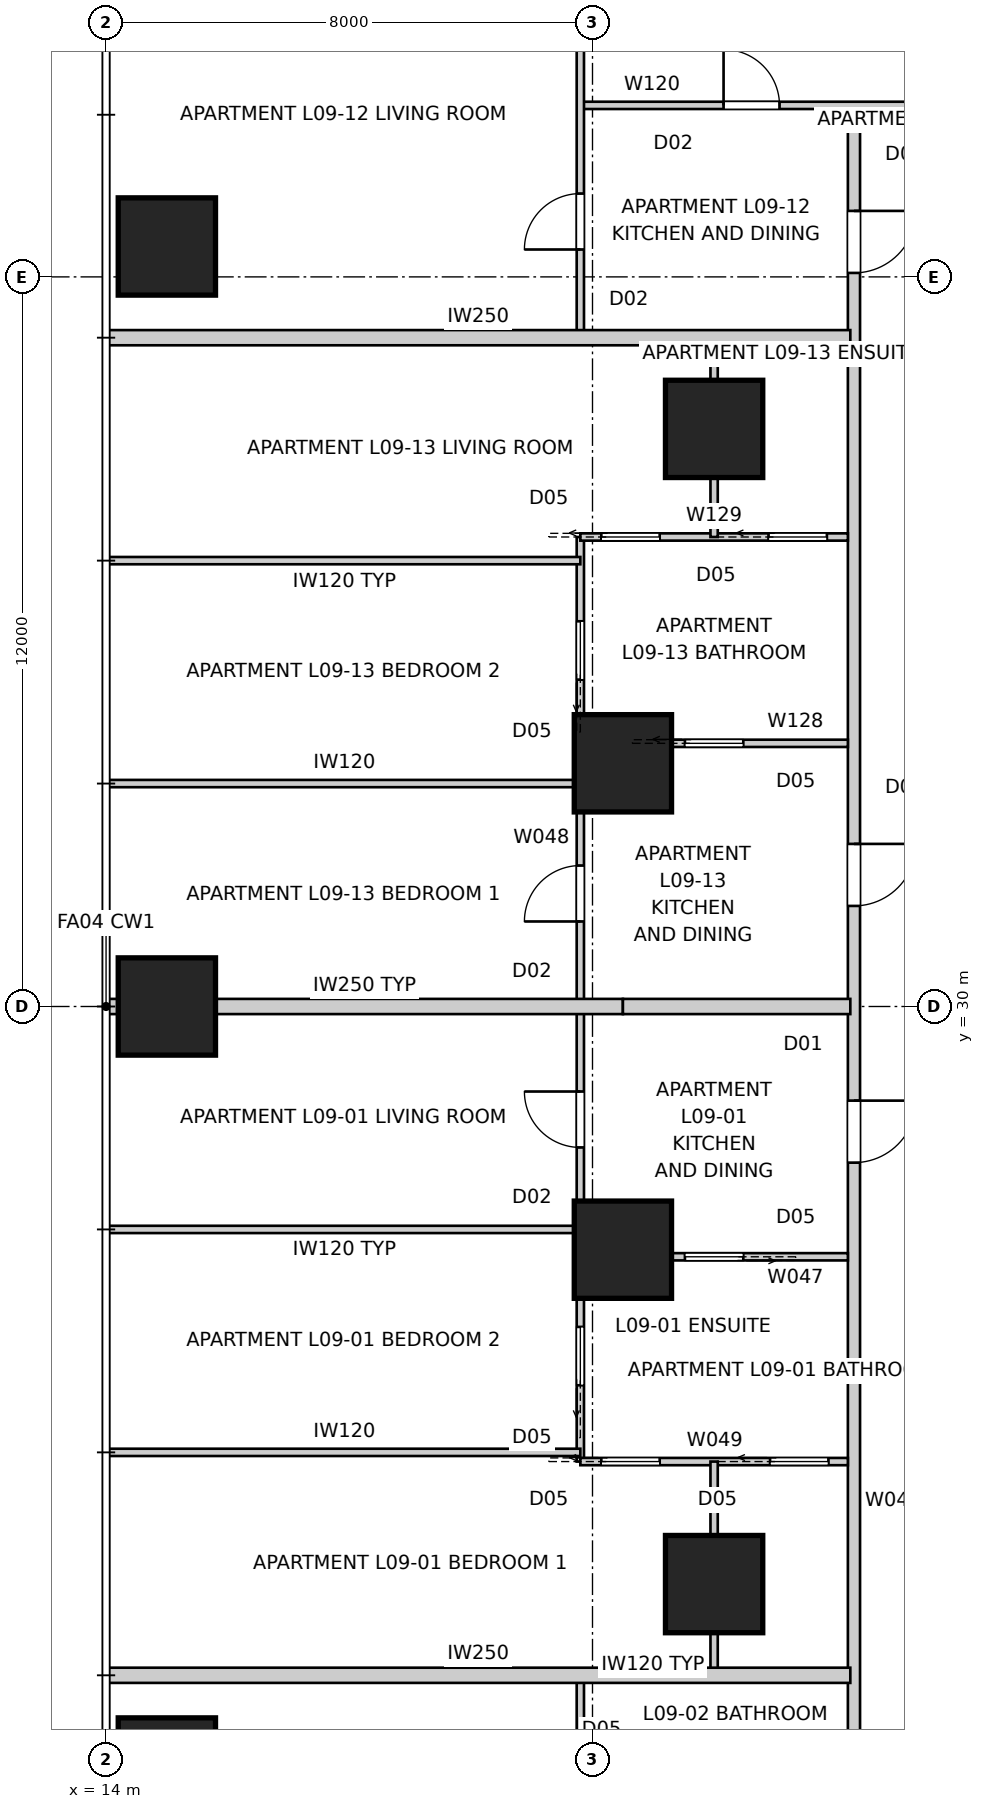
"""IFC4 building model, lengths in metres.
Left out: names, types, materials, properties, quantities, classifications, styles, units other than length and angle.
Written with IfcOpenShell. Run it as: python <this file> out.ifc"""

import sys

from ifc_helpers import new_model, si_unit, direction, frame, frame_2d, origin, origin_2d, place, context, subcontext, project, spatial, rectangle, extrude, element, fill, save


model = new_model("IFC4")
c1 = context("Model", 3, precision=1e-05, world=origin(), true_north=direction((0.0, 1.0)))
c2 = subcontext(c1, "Body", "Model", "MODEL_VIEW")
j1 = project(units=[si_unit("LENGTHUNIT", "METRE"), si_unit("PLANEANGLEUNIT", "RADIAN")], contexts=[c1])
p1 = place(None, origin())
s1 = spatial("IfcSite", under=j1, at=p1, CompositionType="ELEMENT")
p2 = place(p1, origin())
s2 = spatial("IfcBuilding", under=s1, at=p2, CompositionType="ELEMENT")
p3 = place(p2, frame((0.0, 0.0, 35.4)))
s3 = spatial("IfcBuildingStorey", under=s2, at=p3, CompositionType="ELEMENT", Elevation=35.4)
for number, where, z_axis, x_axis in (
    (1, (15.0, 42.5, 0.0), (0.0, 0.0, 1.0), (1.0, 0.0, 0.0)),
    (2, (15.0, 30.0, 0.0), (0.0, 0.0, 1.0), (1.0, 0.0, 0.0)),
    (3, (15.0, 17.5, 0.0), (0.0, 0.0, 1.0), (1.0, 0.0, 0.0)),
    (4, (24.0, 39.5, 0.0), (0.0, 0.0, 1.0), (1.0, 0.0, 0.0)),
    (5, (22.5, 34.0, 0.0), (0.0, 0.0, 1.0), (1.0, 0.0, 0.0)),
    (6, (22.5, 26.0, 0.0), (0.0, 0.0, 1.0), (1.0, 0.0, 0.0)),
    (7, (24.0, 20.5, 0.0), (0.0, 0.0, 1.0), (1.0, 0.0, 0.0)),
):
    element("IfcColumn", number, at=place(p3, frame(where, z_axis=z_axis, x_axis=x_axis)), inside=s3, PredefinedType="COLUMN", context=c2, shape_type="SweptSolid", body=[
        extrude(rectangle(XDim=1.6, YDim=1.6, at=origin_2d()), origin(), (0.0, 0.0, 1.0), 3.4),
    ])
p4 = place(p3, frame((54.5, 44.5, 0.0), z_axis=(0.0, 0.0, 1.0), x_axis=(-1.0, 0.0, 0.0)))
e8 = element("IfcWall", 8, at=p4, inside=s3, PredefinedType="PARTITIONING", context=c2, shape_type="SweptSolid", body=[
    extrude(rectangle(XDim=28.2, YDim=0.2, at=frame_2d((14.1, 0.0))), origin(), (0.0, 0.0, 1.0), 3.25),
])
p5 = place(p4, frame((5.854, 0.0, 0.0)))
e9 = element("IfcOpeningElement", 9, at=p5, cuts=e8, PredefinedType="OPENING", context=c2, shape_type="SweptSolid", body=[
    extrude(rectangle(XDim=1.02, YDim=2.34, at=frame_2d((0.51, 1.17))), frame((0.0, 0.11, 0.0), z_axis=(0.0, -1.0, 0.0), x_axis=(1.0, 0.0, 0.0)), (0.0, 0.0, 1.0), 0.22),
])
p6 = place(p4, frame((18.518, 0.0, 0.0)))
e10 = element("IfcOpeningElement", 10, at=p6, cuts=e8, PredefinedType="OPENING", context=c2, shape_type="SweptSolid", body=[
    extrude(rectangle(XDim=1.02, YDim=2.34, at=frame_2d((0.51, 1.17))), frame((0.0, 0.11, 0.0), z_axis=(0.0, -1.0, 0.0), x_axis=(1.0, 0.0, 0.0)), (0.0, 0.0, 1.0), 0.22),
])
p7 = place(p4, frame((1.415, 0.0, 0.0)))
e11 = element("IfcOpeningElement", 11, at=p7, cuts=e8, PredefinedType="OPENING", context=c2, shape_type="SweptSolid", body=[
    extrude(rectangle(XDim=1.02, YDim=2.34, at=frame_2d((0.51, 1.17))), frame((0.0, 0.11, 0.0), z_axis=(0.0, -1.0, 0.0), x_axis=(1.0, 0.0, 0.0)), (0.0, 0.0, 1.0), 0.22),
])
p8 = place(p3, frame((26.3, 44.5, 0.0), z_axis=(0.0, 0.0, 1.0), x_axis=(0.0, -1.0, 0.0)))
e12 = element("IfcWall", 12, at=p8, inside=s3, PredefinedType="PARTITIONING", context=c2, shape_type="SweptSolid", body=[
    extrude(rectangle(XDim=28.2, YDim=0.2, at=frame_2d((14.1, 0.0))), origin(), (0.0, 0.0, 1.0), 3.25),
])
p9 = place(p8, frame((11.826, 0.0, 0.0)))
e13 = element("IfcOpeningElement", 13, at=p9, cuts=e12, PredefinedType="OPENING", context=c2, shape_type="SweptSolid", body=[
    extrude(rectangle(XDim=1.02, YDim=2.34, at=frame_2d((0.51, 1.17))), frame((0.0, 0.11, 0.0), z_axis=(0.0, -1.0, 0.0), x_axis=(1.0, 0.0, 0.0)), (0.0, 0.0, 1.0), 0.22),
])
p10 = place(p8, frame((16.048, 0.0, 0.0)))
e14 = element("IfcOpeningElement", 14, at=p10, cuts=e12, PredefinedType="OPENING", context=c2, shape_type="SweptSolid", body=[
    extrude(rectangle(XDim=1.02, YDim=2.34, at=frame_2d((0.51, 1.17))), frame((0.0, 0.11, 0.0), z_axis=(0.0, -1.0, 0.0), x_axis=(1.0, 0.0, 0.0)), (0.0, 0.0, 1.0), 0.22),
])
p11 = place(p8, frame((1.415, 0.0, 0.0)))
e15 = element("IfcOpeningElement", 15, at=p11, cuts=e12, PredefinedType="OPENING", context=c2, shape_type="SweptSolid", body=[
    extrude(rectangle(XDim=1.02, YDim=2.1, at=frame_2d((0.51, 1.05))), frame((0.0, 0.11, 0.0), z_axis=(0.0, -1.0, 0.0), x_axis=(1.0, 0.0, 0.0)), (0.0, 0.0, 1.0), 0.22),
])
for number, where, z_axis, x_axis in (
    (16, (14.0, 41.0, 0.0), (0.0, 0.0, 1.0), (1.0, 0.0, 0.0)),
    (17, (14.0, 19.0, 0.0), (0.0, 0.0, 1.0), (1.0, 0.0, 0.0)),
):
    element("IfcWall", number, at=place(p3, frame(where, z_axis=z_axis, x_axis=x_axis)), inside=s3, PredefinedType="PARTITIONING", context=c2, shape_type="SweptSolid", body=[
        extrude(rectangle(XDim=12.24, YDim=0.25, at=frame_2d((6.12, 0.0))), origin(), (0.0, 0.0, 1.0), 3.25),
    ])
p12 = place(p3, frame((14.0, 30.0, 0.0), z_axis=(0.0, 0.0, 1.0), x_axis=(1.0, 0.0, 0.0)))
e18 = element("IfcWall", 18, at=p12, inside=s3, PredefinedType="PARTITIONING", context=c2, shape_type="SweptSolid", body=[
    extrude(rectangle(XDim=8.5, YDim=0.25, at=frame_2d((4.25, 0.0))), origin(), (0.0, 0.0, 1.0), 3.25),
])
p13 = place(p3, frame((22.5, 30.0, 0.0), z_axis=(0.0, 0.0, 1.0), x_axis=(1.0, 0.0, 0.0)))
e19 = element("IfcWall", 19, at=p13, inside=s3, PredefinedType="PARTITIONING", context=c2, shape_type="SweptSolid", body=[
    extrude(rectangle(XDim=3.74, YDim=0.25, at=frame_2d((1.87, 0.0))), origin(), (0.0, 0.0, 1.0), 2.796),
])
p14 = place(p3, frame((26.2, 25.884, 0.0), z_axis=(0.0, 0.0, 1.0), x_axis=(-1.0, 0.0, 0.0)))
e20 = element("IfcWall", 20, at=p14, inside=s3, PredefinedType="PARTITIONING", context=c2, shape_type="SweptSolid", body=[
    extrude(rectangle(XDim=4.4, YDim=0.12, at=frame_2d((2.2, 0.0))), origin(), (0.0, 0.0, 1.0), 3.25),
])
p15 = place(p14, frame((1.72, 0.0, 0.0)))
e21 = element("IfcOpeningElement", 21, at=p15, cuts=e20, PredefinedType="OPENING", context=c2, shape_type="SweptSolid", body=[
    extrude(rectangle(XDim=0.96, YDim=2.1, at=frame_2d((0.48, 1.05))), frame((0.0, 0.07, 0.0), z_axis=(0.0, -1.0, 0.0), x_axis=(1.0, 0.0, 0.0)), (0.0, 0.0, 1.0), 0.14),
])
p16 = place(p3, frame((21.8, 22.515, 0.0), z_axis=(0.0, 0.0, 1.0), x_axis=(0.0, 1.0, 0.0)))
e22 = element("IfcWall", 22, at=p16, inside=s3, PredefinedType="PARTITIONING", context=c2, shape_type="SweptSolid", body=[
    extrude(rectangle(XDim=15.207, YDim=0.12, at=frame_2d((7.603, 0.0))), origin(), (0.0, 0.0, 1.0), 3.25),
])
p17 = place(p16, frame((8.883, 0.0, 0.0)))
e23 = element("IfcOpeningElement", 23, at=p17, cuts=e22, PredefinedType="OPENING", context=c2, shape_type="SweptSolid", body=[
    extrude(rectangle(XDim=0.92, YDim=2.34, at=frame_2d((0.46, 1.17))), frame((0.0, 0.07, 0.0), z_axis=(0.0, -1.0, 0.0), x_axis=(1.0, 0.0, 0.0)), (0.0, 0.0, 1.0), 0.14),
])
p18 = place(p16, frame((5.166, 0.0, 0.0)))
e24 = element("IfcOpeningElement", 24, at=p18, cuts=e22, PredefinedType="OPENING", context=c2, shape_type="SweptSolid", body=[
    extrude(rectangle(XDim=0.92, YDim=2.34, at=frame_2d((0.46, 1.17))), frame((0.0, 0.07, 0.0), z_axis=(0.0, -1.0, 0.0), x_axis=(1.0, 0.0, 0.0)), (0.0, 0.0, 1.0), 0.14),
])
p19 = place(p16, frame((12.86, 0.0, 0.0)))
e25 = element("IfcOpeningElement", 25, at=p19, cuts=e22, PredefinedType="OPENING", context=c2, shape_type="SweptSolid", body=[
    extrude(rectangle(XDim=0.96, YDim=2.1, at=frame_2d((0.48, 1.05))), frame((0.0, 0.07, 0.0), z_axis=(0.0, -1.0, 0.0), x_axis=(1.0, 0.0, 0.0)), (0.0, 0.0, 1.0), 0.14),
])
p20 = place(p16, frame((1.255, 0.0, 0.0)))
e26 = element("IfcOpeningElement", 26, at=p20, cuts=e22, PredefinedType="OPENING", context=c2, shape_type="SweptSolid", body=[
    extrude(rectangle(XDim=0.96, YDim=2.1, at=frame_2d((0.48, 1.05))), frame((0.0, 0.07, 0.0), z_axis=(0.0, -1.0, 0.0), x_axis=(1.0, 0.0, 0.0)), (0.0, 0.0, 1.0), 0.14),
])
p21 = place(p3, frame((21.8, 22.515, 0.0), z_axis=(0.0, 0.0, 1.0), x_axis=(1.0, 0.0, 0.0)))
e27 = element("IfcWall", 27, at=p21, inside=s3, PredefinedType="PARTITIONING", context=c2, shape_type="SweptSolid", body=[
    extrude(rectangle(XDim=4.4, YDim=0.12, at=frame_2d((2.2, 0.0))), origin(), (0.0, 0.0, 1.0), 3.25),
])
p22 = place(p21, frame((0.345, 0.0, 0.0)))
e28 = element("IfcOpeningElement", 28, at=p22, cuts=e27, PredefinedType="OPENING", context=c2, shape_type="SweptSolid", body=[
    extrude(rectangle(XDim=0.96, YDim=2.1, at=frame_2d((0.48, 1.05))), frame((0.0, 0.07, 0.0), z_axis=(0.0, -1.0, 0.0), x_axis=(1.0, 0.0, 0.0)), (0.0, 0.0, 1.0), 0.14),
])
p23 = place(p21, frame((3.12, 0.0, 0.0)))
e29 = element("IfcOpeningElement", 29, at=p23, cuts=e27, PredefinedType="OPENING", context=c2, shape_type="SweptSolid", body=[
    extrude(rectangle(XDim=0.96, YDim=2.1, at=frame_2d((0.48, 1.05))), frame((0.0, 0.07, 0.0), z_axis=(0.0, -1.0, 0.0), x_axis=(1.0, 0.0, 0.0)), (0.0, 0.0, 1.0), 0.14),
])
p24 = place(p3, frame((24.0, 19.0, 0.0), z_axis=(0.0, 0.0, 1.0), x_axis=(0.0, 1.0, 0.0)))
e30 = element("IfcWall", 30, at=p24, inside=s3, PredefinedType="PARTITIONING", context=c2, shape_type="SweptSolid", body=[
    extrude(rectangle(XDim=3.515, YDim=0.12, at=frame_2d((1.758, 0.0))), origin(), (0.0, 0.0, 1.0), 2.549),
])
for number, where, z_axis, x_axis in (
    (31, (21.8, 26.333, 0.0), (0.0, 0.0, 1.0), (-1.0, 0.0, 0.0)),
    (32, (14.04, 22.667, 0.0), (0.0, 0.0, 1.0), (1.0, 0.0, 0.0)),
):
    element("IfcWall", number, at=place(p3, frame(where, z_axis=z_axis, x_axis=x_axis)), inside=s3, PredefinedType="PARTITIONING", context=c2, shape_type="SweptSolid", body=[
        extrude(rectangle(XDim=7.76, YDim=0.12, at=frame_2d((3.88, 0.0))), origin(), (0.0, 0.0, 1.0), 3.25),
    ])
p25 = place(p3, frame((21.8, 11.8, 0.0), z_axis=(0.0, 0.0, 1.0), x_axis=(0.0, 1.0, 0.0)))
e33 = element("IfcWall", 33, at=p25, inside=s3, PredefinedType="PARTITIONING", context=c2, shape_type="SweptSolid", body=[
    extrude(rectangle(XDim=7.2, YDim=0.12, at=frame_2d((3.6, 0.0))), origin(), (0.0, 0.0, 1.0), 3.25),
])
p26 = place(p25, frame((1.332, 0.0, 0.0)))
e34 = element("IfcOpeningElement", 34, at=p26, cuts=e33, PredefinedType="OPENING", context=c2, shape_type="SweptSolid", body=[
    extrude(rectangle(XDim=0.92, YDim=2.34, at=frame_2d((0.46, 1.17))), frame((0.0, 0.07, 0.0), z_axis=(0.0, -1.0, 0.0), x_axis=(1.0, 0.0, 0.0)), (0.0, 0.0, 1.0), 0.14),
])
p27 = place(p25, frame((4.119, 0.0, 0.0)))
e35 = element("IfcOpeningElement", 35, at=p27, cuts=e33, PredefinedType="OPENING", context=c2, shape_type="SweptSolid", body=[
    extrude(rectangle(XDim=0.92, YDim=2.34, at=frame_2d((0.46, 1.17))), frame((0.0, 0.07, 0.0), z_axis=(0.0, -1.0, 0.0), x_axis=(1.0, 0.0, 0.0)), (0.0, 0.0, 1.0), 0.14),
])
p28 = place(p3, frame((21.8, 44.821, 0.0), z_axis=(0.0, 0.0, 1.0), x_axis=(1.0, 0.0, 0.0)))
e36 = element("IfcWall", 36, at=p28, inside=s3, PredefinedType="PARTITIONING", context=c2, shape_type="SweptSolid", body=[
    extrude(rectangle(XDim=5.631, YDim=0.12, at=frame_2d((2.815, 0.0))), origin(), (0.0, 0.0, 1.0), 3.25),
])
p29 = place(p28, frame((2.355, 0.0, 0.0)))
e37 = element("IfcOpeningElement", 37, at=p29, cuts=e36, PredefinedType="OPENING", context=c2, shape_type="SweptSolid", body=[
    extrude(rectangle(XDim=0.92, YDim=2.34, at=frame_2d((0.46, 1.17))), frame((0.0, 0.07, 0.0), z_axis=(0.0, -1.0, 0.0), x_axis=(1.0, 0.0, 0.0)), (0.0, 0.0, 1.0), 0.14),
])
p30 = place(p3, frame((21.8, 41.0, 0.0), z_axis=(0.0, 0.0, 1.0), x_axis=(0.0, 1.0, 0.0)))
e38 = element("IfcWall", 38, at=p30, inside=s3, PredefinedType="PARTITIONING", context=c2, shape_type="SweptSolid", body=[
    extrude(rectangle(XDim=7.2, YDim=0.12, at=frame_2d((3.6, 0.0))), origin(), (0.0, 0.0, 1.0), 3.25),
])
p31 = place(p30, frame((1.45, 0.0, 0.0)))
e39 = element("IfcOpeningElement", 39, at=p31, cuts=e38, PredefinedType="OPENING", context=c2, shape_type="SweptSolid", body=[
    extrude(rectangle(XDim=0.92, YDim=2.34, at=frame_2d((0.46, 1.17))), frame((0.0, 0.07, 0.0), z_axis=(0.0, -1.0, 0.0), x_axis=(1.0, 0.0, 0.0)), (0.0, 0.0, 1.0), 0.14),
])
p32 = place(p3, frame((21.8, 34.328, 0.0), z_axis=(0.0, 0.0, 1.0), x_axis=(1.0, 0.0, 0.0)))
e40 = element("IfcWall", 40, at=p32, inside=s3, PredefinedType="PARTITIONING", context=c2, shape_type="SweptSolid", body=[
    extrude(rectangle(XDim=4.4, YDim=0.12, at=frame_2d((2.2, 0.0))), origin(), (0.0, 0.0, 1.0), 3.25),
])
p33 = place(p32, frame((1.72, 0.0, 0.0)))
e41 = element("IfcOpeningElement", 41, at=p33, cuts=e40, PredefinedType="OPENING", context=c2, shape_type="SweptSolid", body=[
    extrude(rectangle(XDim=0.96, YDim=2.1, at=frame_2d((0.48, 1.05))), frame((0.0, 0.07, 0.0), z_axis=(0.0, -1.0, 0.0), x_axis=(1.0, 0.0, 0.0)), (0.0, 0.0, 1.0), 0.14),
])
p34 = place(p3, frame((21.8, 37.722, 0.0), z_axis=(0.0, 0.0, 1.0), x_axis=(1.0, 0.0, 0.0)))
e42 = element("IfcWall", 42, at=p34, inside=s3, PredefinedType="PARTITIONING", context=c2, shape_type="SweptSolid", body=[
    extrude(rectangle(XDim=4.4, YDim=0.12, at=frame_2d((2.2, 0.0))), origin(), (0.0, 0.0, 1.0), 3.25),
])
p35 = place(p34, frame((3.095, 0.0, 0.0)))
e43 = element("IfcOpeningElement", 43, at=p35, cuts=e42, PredefinedType="OPENING", context=c2, shape_type="SweptSolid", body=[
    extrude(rectangle(XDim=0.96, YDim=2.1, at=frame_2d((0.48, 1.05))), frame((0.0, 0.07, 0.0), z_axis=(0.0, -1.0, 0.0), x_axis=(1.0, 0.0, 0.0)), (0.0, 0.0, 1.0), 0.14),
])
p36 = place(p34, frame((0.345, 0.0, 0.0)))
e44 = element("IfcOpeningElement", 44, at=p36, cuts=e42, PredefinedType="OPENING", context=c2, shape_type="SweptSolid", body=[
    extrude(rectangle(XDim=0.96, YDim=2.1, at=frame_2d((0.48, 1.05))), frame((0.0, 0.07, 0.0), z_axis=(0.0, -1.0, 0.0), x_axis=(1.0, 0.0, 0.0)), (0.0, 0.0, 1.0), 0.14),
])
p37 = place(p3, frame((24.0, 37.722, 0.0), z_axis=(0.0, 0.0, 1.0), x_axis=(0.0, 1.0, 0.0)))
e45 = element("IfcWall", 45, at=p37, inside=s3, PredefinedType="PARTITIONING", context=c2, shape_type="SweptSolid", body=[
    extrude(rectangle(XDim=3.278, YDim=0.12, at=frame_2d((1.639, 0.0))), origin(), (0.0, 0.0, 1.0), 2.549),
])
for number, where, z_axis, x_axis in (
    (46, (21.8, 37.333, 0.0), (0.0, 0.0, 1.0), (-1.0, 0.0, 0.0)),
    (47, (14.04, 33.667, 0.0), (0.0, 0.0, 1.0), (1.0, 0.0, 0.0)),
):
    element("IfcWall", number, at=place(p3, frame(where, z_axis=z_axis, x_axis=x_axis)), inside=s3, PredefinedType="PARTITIONING", context=c2, shape_type="SweptSolid", body=[
        extrude(rectangle(XDim=7.76, YDim=0.12, at=frame_2d((3.88, 0.0))), origin(), (0.0, 0.0, 1.0), 3.25),
    ])
p38 = place(p9, origin())
e48 = element("IfcDoor", 48, at=p38, inside=s3, OperationType="SINGLE_SWING_LEFT", PredefinedType="DOOR", context=c2, shape_type="SweptSolid", body=[
    extrude(rectangle(XDim=1.02, YDim=2.34, at=frame_2d((0.51, 1.17))), frame((0.0, 0.025, 0.0), z_axis=(0.0, -1.0, 0.0), x_axis=(1.0, 0.0, 0.0)), (0.0, 0.0, 1.0), 0.05),
])
fill(e13, e48)
p39 = place(p10, origin())
e49 = element("IfcDoor", 49, at=p39, inside=s3, OperationType="SINGLE_SWING_LEFT", PredefinedType="DOOR", context=c2, shape_type="SweptSolid", body=[
    extrude(rectangle(XDim=1.02, YDim=2.34, at=frame_2d((0.51, 1.17))), frame((0.0, 0.025, 0.0), z_axis=(0.0, -1.0, 0.0), x_axis=(1.0, 0.0, 0.0)), (0.0, 0.0, 1.0), 0.05),
])
fill(e14, e49)
p40 = place(p11, origin())
e50 = element("IfcDoor", 50, at=p40, inside=s3, OperationType="SINGLE_SWING_LEFT", PredefinedType="DOOR", context=c2, shape_type="SweptSolid", body=[
    extrude(rectangle(XDim=1.02, YDim=2.1, at=frame_2d((0.51, 1.05))), frame((0.0, 0.025, 0.0), z_axis=(0.0, -1.0, 0.0), x_axis=(1.0, 0.0, 0.0)), (0.0, 0.0, 1.0), 0.05),
])
fill(e15, e50)
p41 = place(p33, origin())
e51 = element("IfcDoor", 51, at=p41, inside=s3, OperationType="SLIDING_TO_LEFT", PredefinedType="DOOR", context=c2, shape_type="SweptSolid", body=[
    extrude(rectangle(XDim=0.96, YDim=2.1, at=frame_2d((0.48, 1.05))), frame((0.0, 0.025, 0.0), z_axis=(0.0, -1.0, 0.0), x_axis=(1.0, 0.0, 0.0)), (0.0, 0.0, 1.0), 0.05),
])
fill(e41, e51)
p42 = place(p17, origin())
e52 = element("IfcDoor", 52, at=p42, inside=s3, OperationType="SINGLE_SWING_LEFT", PredefinedType="DOOR", context=c2, shape_type="SweptSolid", body=[
    extrude(rectangle(XDim=0.92, YDim=2.34, at=frame_2d((0.46, 1.17))), frame((0.0, 0.025, 0.0), z_axis=(0.0, -1.0, 0.0), x_axis=(1.0, 0.0, 0.0)), (0.0, 0.0, 1.0), 0.05),
])
fill(e23, e52)
p43 = place(p15, origin())
e53 = element("IfcDoor", 53, at=p43, inside=s3, OperationType="SLIDING_TO_LEFT", PredefinedType="DOOR", context=c2, shape_type="SweptSolid", body=[
    extrude(rectangle(XDim=0.96, YDim=2.1, at=frame_2d((0.48, 1.05))), frame((0.0, 0.025, 0.0), z_axis=(0.0, -1.0, 0.0), x_axis=(1.0, 0.0, 0.0)), (0.0, 0.0, 1.0), 0.05),
])
fill(e21, e53)
p44 = place(p18, origin())
e54 = element("IfcDoor", 54, at=p44, inside=s3, OperationType="SINGLE_SWING_RIGHT", PredefinedType="DOOR", context=c2, shape_type="SweptSolid", body=[
    extrude(rectangle(XDim=0.92, YDim=2.34, at=frame_2d((0.46, 1.17))), frame((0.0, 0.025, 0.0), z_axis=(0.0, -1.0, 0.0), x_axis=(1.0, 0.0, 0.0)), (0.0, 0.0, 1.0), 0.05),
])
fill(e24, e54)
p45 = place(p29, origin())
e55 = element("IfcDoor", 55, at=p45, inside=s3, OperationType="SINGLE_SWING_LEFT", PredefinedType="DOOR", context=c2, shape_type="SweptSolid", body=[
    extrude(rectangle(XDim=0.92, YDim=2.34, at=frame_2d((0.46, 1.17))), frame((0.0, 0.025, 0.0), z_axis=(0.0, -1.0, 0.0), x_axis=(1.0, 0.0, 0.0)), (0.0, 0.0, 1.0), 0.05),
])
fill(e37, e55)
p46 = place(p31, origin())
e56 = element("IfcDoor", 56, at=p46, inside=s3, OperationType="SINGLE_SWING_LEFT", PredefinedType="DOOR", context=c2, shape_type="SweptSolid", body=[
    extrude(rectangle(XDim=0.92, YDim=2.34, at=frame_2d((0.46, 1.17))), frame((0.0, 0.025, 0.0), z_axis=(0.0, -1.0, 0.0), x_axis=(1.0, 0.0, 0.0)), (0.0, 0.0, 1.0), 0.05),
])
fill(e39, e56)
p47 = place(p19, origin())
e57 = element("IfcDoor", 57, at=p47, inside=s3, OperationType="SLIDING_TO_LEFT", PredefinedType="DOOR", context=c2, shape_type="SweptSolid", body=[
    extrude(rectangle(XDim=0.96, YDim=2.1, at=frame_2d((0.48, 1.05))), frame((0.0, 0.025, 0.0), z_axis=(0.0, -1.0, 0.0), x_axis=(1.0, 0.0, 0.0)), (0.0, 0.0, 1.0), 0.05),
])
fill(e25, e57)
p48 = place(p35, origin())
e58 = element("IfcDoor", 58, at=p48, inside=s3, OperationType="SLIDING_TO_LEFT", PredefinedType="DOOR", context=c2, shape_type="SweptSolid", body=[
    extrude(rectangle(XDim=0.96, YDim=2.1, at=frame_2d((0.48, 1.05))), frame((0.0, 0.025, 0.0), z_axis=(0.0, -1.0, 0.0), x_axis=(1.0, 0.0, 0.0)), (0.0, 0.0, 1.0), 0.05),
])
fill(e43, e58)
p49 = place(p36, origin())
e59 = element("IfcDoor", 59, at=p49, inside=s3, OperationType="SLIDING_TO_LEFT", PredefinedType="DOOR", context=c2, shape_type="SweptSolid", body=[
    extrude(rectangle(XDim=0.96, YDim=2.1, at=frame_2d((0.48, 1.05))), frame((0.0, 0.025, 0.0), z_axis=(0.0, -1.0, 0.0), x_axis=(1.0, 0.0, 0.0)), (0.0, 0.0, 1.0), 0.05),
])
fill(e44, e59)
p50 = place(p20, origin())
e60 = element("IfcDoor", 60, at=p50, inside=s3, OperationType="SLIDING_TO_LEFT", PredefinedType="DOOR", context=c2, shape_type="SweptSolid", body=[
    extrude(rectangle(XDim=0.96, YDim=2.1, at=frame_2d((0.48, 1.05))), frame((0.0, 0.025, 0.0), z_axis=(0.0, -1.0, 0.0), x_axis=(1.0, 0.0, 0.0)), (0.0, 0.0, 1.0), 0.05),
])
fill(e26, e60)
p51 = place(p22, origin())
e61 = element("IfcDoor", 61, at=p51, inside=s3, OperationType="SLIDING_TO_LEFT", PredefinedType="DOOR", context=c2, shape_type="SweptSolid", body=[
    extrude(rectangle(XDim=0.96, YDim=2.1, at=frame_2d((0.48, 1.05))), frame((0.0, 0.025, 0.0), z_axis=(0.0, -1.0, 0.0), x_axis=(1.0, 0.0, 0.0)), (0.0, 0.0, 1.0), 0.05),
])
fill(e28, e61)
p52 = place(p23, origin())
e62 = element("IfcDoor", 62, at=p52, inside=s3, OperationType="SLIDING_TO_LEFT", PredefinedType="DOOR", context=c2, shape_type="SweptSolid", body=[
    extrude(rectangle(XDim=0.96, YDim=2.1, at=frame_2d((0.48, 1.05))), frame((0.0, 0.025, 0.0), z_axis=(0.0, -1.0, 0.0), x_axis=(1.0, 0.0, 0.0)), (0.0, 0.0, 1.0), 0.05),
])
fill(e29, e62)
save(model, sys.argv[1])
